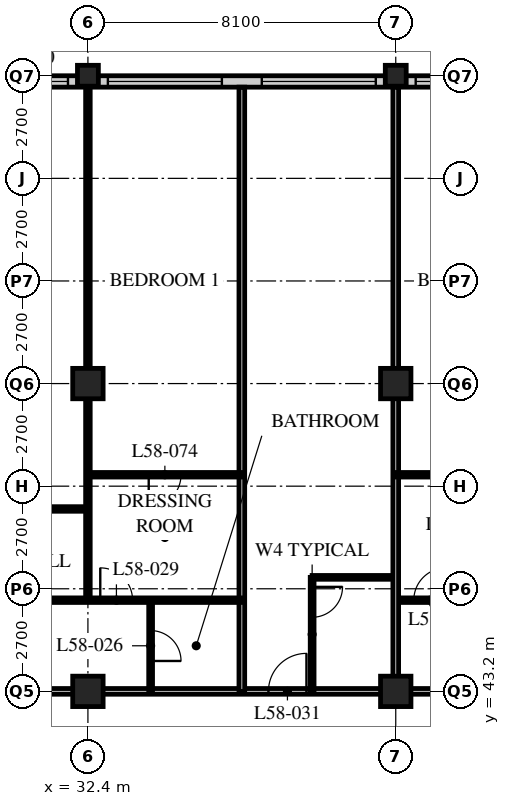
"""IFC4 building model, lengths in metres.
Left out: names, types, materials, properties, quantities, classifications, styles, units other than length and angle.
Written with IfcOpenShell. Run it as: python <this file> out.ifc"""

import sys

from ifc_helpers import new_model, si_unit, direction, frame, frame_2d, origin, origin_2d, place, context, subcontext, project, spatial, rectangle, hollow_rectangle, extrude, element, fill, save


model = new_model("IFC4")
c1 = context("Model", 3, precision=1e-05, world=origin(), true_north=direction((0.0, 1.0)))
c2 = subcontext(c1, "Body", "Model", "MODEL_VIEW")
j1 = project(units=[si_unit("LENGTHUNIT", "METRE"), si_unit("PLANEANGLEUNIT", "RADIAN")], contexts=[c1])
p1 = place(None, origin())
s1 = spatial("IfcSite", under=j1, at=p1, CompositionType="ELEMENT")
p2 = place(p1, origin())
s2 = spatial("IfcBuilding", under=s1, at=p2, CompositionType="ELEMENT")
p3 = place(p2, frame((0.0, 0.0, 224.4)))
s3 = spatial("IfcBuildingStorey", under=s2, at=p3, CompositionType="ELEMENT", Elevation=224.4)
for number, where, z_axis, x_axis in (
    (1, (32.4, 43.2, 0.0), (0.0, 0.0, 1.0), (1.0, 0.0, 0.0)),
    (2, (32.4, 51.3, 0.0), (0.0, 0.0, 1.0), (1.0, 0.0, 0.0)),
):
    element("IfcColumn", number, at=place(p3, frame(where, z_axis=z_axis, x_axis=x_axis)), inside=s3, PredefinedType="COLUMN", context=c2, shape_type="SweptSolid", body=[
        extrude(hollow_rectangle(XDim=0.8, YDim=0.8, WallThickness=0.08, at=origin_2d()), origin(), (0.0, 0.0, 1.0), 3.6),
    ])
p4 = place(p3, frame((32.4, 59.4, 0.0), z_axis=(0.0, 0.0, 1.0), x_axis=(1.0, 0.0, 0.0)))
e3 = element("IfcColumn", 3, at=p4, inside=s3, PredefinedType="COLUMN", context=c2, shape_type="SweptSolid", body=[
    extrude(hollow_rectangle(XDim=0.55, YDim=0.55, WallThickness=0.045, at=origin_2d()), origin(), (0.0, 0.0, 1.0), 3.6),
])
for number, where, z_axis, x_axis in (
    (4, (40.5, 43.2, 0.0), (0.0, 0.0, 1.0), (1.0, 0.0, 0.0)),
    (5, (40.5, 51.3, 0.0), (0.0, 0.0, 1.0), (1.0, 0.0, 0.0)),
):
    element("IfcColumn", number, at=place(p3, frame(where, z_axis=z_axis, x_axis=x_axis)), inside=s3, PredefinedType="COLUMN", context=c2, shape_type="SweptSolid", body=[
        extrude(hollow_rectangle(XDim=0.8, YDim=0.8, WallThickness=0.08, at=origin_2d()), origin(), (0.0, 0.0, 1.0), 3.6),
    ])
p5 = place(p3, frame((40.5, 59.4, 0.0), z_axis=(0.0, 0.0, 1.0), x_axis=(1.0, 0.0, 0.0)))
e6 = element("IfcColumn", 6, at=p5, inside=s3, PredefinedType="COLUMN", context=c2, shape_type="SweptSolid", body=[
    extrude(hollow_rectangle(XDim=0.55, YDim=0.55, WallThickness=0.045, at=origin_2d()), origin(), (0.0, 0.0, 1.0), 3.6),
])
p6 = place(p3, frame((48.3, 59.25, 0.0), z_axis=(0.0, 0.0, 1.0), x_axis=(-1.0, 0.0, 0.0)))
e7 = element("IfcWall", 7, at=p6, inside=s3, PredefinedType="SOLIDWALL", context=c2, shape_type="SweptSolid", body=[
    extrude(rectangle(XDim=40.2, YDim=0.3, at=frame_2d((20.1, 0.0))), origin(), (0.0, 0.0, 1.0), 3.39),
])
p7 = place(p6, frame((0.225, 0.0, 0.6)))
e8 = element("IfcOpeningElement", 8, at=p7, cuts=e7, PredefinedType="OPENING", context=c2, shape_type="SweptSolid", body=[
    extrude(rectangle(XDim=3.0, YDim=2.0, at=frame_2d((1.5, 1.0))), frame((0.0, 0.16, 0.0), z_axis=(0.0, -1.0, 0.0), x_axis=(1.0, 0.0, 0.0)), (0.0, 0.0, 1.0), 0.32),
])
p8 = place(p6, frame((4.275, 0.0, 0.6)))
e9 = element("IfcOpeningElement", 9, at=p8, cuts=e7, PredefinedType="OPENING", context=c2, shape_type="SweptSolid", body=[
    extrude(rectangle(XDim=3.0, YDim=2.0, at=frame_2d((1.5, 1.0))), frame((0.0, 0.16, 0.0), z_axis=(0.0, -1.0, 0.0), x_axis=(1.0, 0.0, 0.0)), (0.0, 0.0, 1.0), 0.32),
])
p9 = place(p6, frame((8.325, 0.0, 0.6)))
e10 = element("IfcOpeningElement", 10, at=p9, cuts=e7, PredefinedType="OPENING", context=c2, shape_type="SweptSolid", body=[
    extrude(rectangle(XDim=3.0, YDim=2.0, at=frame_2d((1.5, 1.0))), frame((0.0, 0.16, 0.0), z_axis=(0.0, -1.0, 0.0), x_axis=(1.0, 0.0, 0.0)), (0.0, 0.0, 1.0), 0.32),
])
p10 = place(p6, frame((12.375, 0.0, 0.6)))
e11 = element("IfcOpeningElement", 11, at=p10, cuts=e7, PredefinedType="OPENING", context=c2, shape_type="SweptSolid", body=[
    extrude(rectangle(XDim=3.0, YDim=2.0, at=frame_2d((1.5, 1.0))), frame((0.0, 0.16, 0.0), z_axis=(0.0, -1.0, 0.0), x_axis=(1.0, 0.0, 0.0)), (0.0, 0.0, 1.0), 0.32),
])
p11 = place(p6, frame((16.425, 0.0, 0.6)))
e12 = element("IfcOpeningElement", 12, at=p11, cuts=e7, PredefinedType="OPENING", context=c2, shape_type="SweptSolid", body=[
    extrude(rectangle(XDim=3.0, YDim=2.0, at=frame_2d((1.5, 1.0))), frame((0.0, 0.16, 0.0), z_axis=(0.0, -1.0, 0.0), x_axis=(1.0, 0.0, 0.0)), (0.0, 0.0, 1.0), 0.32),
])
p12 = place(p6, frame((20.475, 0.0, 0.6)))
e13 = element("IfcOpeningElement", 13, at=p12, cuts=e7, PredefinedType="OPENING", context=c2, shape_type="SweptSolid", body=[
    extrude(rectangle(XDim=3.0, YDim=2.0, at=frame_2d((1.5, 1.0))), frame((0.0, 0.16, 0.0), z_axis=(0.0, -1.0, 0.0), x_axis=(1.0, 0.0, 0.0)), (0.0, 0.0, 1.0), 0.32),
])
p13 = place(p6, frame((24.525, 0.0, 0.6)))
e14 = element("IfcOpeningElement", 14, at=p13, cuts=e7, PredefinedType="OPENING", context=c2, shape_type="SweptSolid", body=[
    extrude(rectangle(XDim=3.0, YDim=2.0, at=frame_2d((1.5, 1.0))), frame((0.0, 0.16, 0.0), z_axis=(0.0, -1.0, 0.0), x_axis=(1.0, 0.0, 0.0)), (0.0, 0.0, 1.0), 0.32),
])
p14 = place(p6, frame((28.575, 0.0, 0.6)))
e15 = element("IfcOpeningElement", 15, at=p14, cuts=e7, PredefinedType="OPENING", context=c2, shape_type="SweptSolid", body=[
    extrude(rectangle(XDim=3.0, YDim=2.0, at=frame_2d((1.5, 1.0))), frame((0.0, 0.16, 0.0), z_axis=(0.0, -1.0, 0.0), x_axis=(1.0, 0.0, 0.0)), (0.0, 0.0, 1.0), 0.32),
])
p15 = place(p6, frame((32.625, 0.0, 0.6)))
e16 = element("IfcOpeningElement", 16, at=p15, cuts=e7, PredefinedType="OPENING", context=c2, shape_type="SweptSolid", body=[
    extrude(rectangle(XDim=3.0, YDim=2.0, at=frame_2d((1.5, 1.0))), frame((0.0, 0.16, 0.0), z_axis=(0.0, -1.0, 0.0), x_axis=(1.0, 0.0, 0.0)), (0.0, 0.0, 1.0), 0.32),
])
p16 = place(p6, frame((36.675, 0.0, 0.6)))
e17 = element("IfcOpeningElement", 17, at=p16, cuts=e7, PredefinedType="OPENING", context=c2, shape_type="SweptSolid", body=[
    extrude(rectangle(XDim=3.0, YDim=2.0, at=frame_2d((1.5, 1.0))), frame((0.0, 0.16, 0.0), z_axis=(0.0, -1.0, 0.0), x_axis=(1.0, 0.0, 0.0)), (0.0, 0.0, 1.0), 0.32),
])
p17 = place(p3, frame((8.1, 43.2, 0.0), z_axis=(0.0, 0.0, 1.0), x_axis=(1.0, 0.0, 0.0)))
e18 = element("IfcWall", 18, at=p17, inside=s3, PredefinedType="PARTITIONING", context=c2, shape_type="SweptSolid", body=[
    extrude(rectangle(XDim=36.45, YDim=0.15, at=frame_2d((18.225, 0.0))), origin(), (0.0, 0.0, 1.0), 2.628),
])
p18 = place(p17, frame((4.45, 0.0, 0.0)))
e19 = element("IfcOpeningElement", 19, at=p18, cuts=e18, PredefinedType="OPENING", context=c2, shape_type="SweptSolid", body=[
    extrude(rectangle(XDim=1.0, YDim=2.1, at=frame_2d((0.5, 1.05))), frame((0.0, 0.085, 0.0), z_axis=(0.0, -1.0, 0.0), x_axis=(1.0, 0.0, 0.0)), (0.0, 0.0, 1.0), 0.17),
])
p19 = place(p17, frame((17.1, 0.0, 0.0)))
e20 = element("IfcOpeningElement", 20, at=p19, cuts=e18, PredefinedType="OPENING", context=c2, shape_type="SweptSolid", body=[
    extrude(rectangle(XDim=1.0, YDim=2.1, at=frame_2d((0.5, 1.05))), frame((0.0, 0.085, 0.0), z_axis=(0.0, -1.0, 0.0), x_axis=(1.0, 0.0, 0.0)), (0.0, 0.0, 1.0), 0.17),
])
p20 = place(p17, frame((29.05, 0.0, 0.0)))
e21 = element("IfcOpeningElement", 21, at=p20, cuts=e18, PredefinedType="OPENING", context=c2, shape_type="SweptSolid", body=[
    extrude(rectangle(XDim=1.0, YDim=2.1, at=frame_2d((0.5, 1.05))), frame((0.0, 0.085, 0.0), z_axis=(0.0, -1.0, 0.0), x_axis=(1.0, 0.0, 0.0)), (0.0, 0.0, 1.0), 0.17),
])
p21 = place(p17, frame((33.925, 0.0, 0.0)))
e22 = element("IfcOpeningElement", 22, at=p21, cuts=e18, PredefinedType="OPENING", context=c2, shape_type="SweptSolid", body=[
    extrude(rectangle(XDim=1.0, YDim=2.1, at=frame_2d((0.5, 1.05))), frame((0.0, 0.085, 0.0), z_axis=(0.0, -1.0, 0.0), x_axis=(1.0, 0.0, 0.0)), (0.0, 0.0, 1.0), 0.17),
])
p22 = place(p17, frame((1.525, 0.0, 0.0)))
e23 = element("IfcOpeningElement", 23, at=p22, cuts=e18, PredefinedType="OPENING", context=c2, shape_type="SweptSolid", body=[
    extrude(rectangle(XDim=1.0, YDim=2.1, at=frame_2d((0.5, 1.05))), frame((0.0, 0.085, 0.0), z_axis=(0.0, -1.0, 0.0), x_axis=(1.0, 0.0, 0.0)), (0.0, 0.0, 1.0), 0.17),
])
p23 = place(p3, frame((34.05, 43.2, 0.0), z_axis=(0.0, 0.0, 1.0), x_axis=(0.0, 1.0, 0.0)))
e24 = element("IfcWall", 24, at=p23, inside=s3, PredefinedType="PARTITIONING", context=c2, shape_type="SweptSolid", body=[
    extrude(rectangle(XDim=2.4, YDim=0.1, at=frame_2d((1.2, 0.0))), origin(), (0.0, 0.0, 1.0), 3.39),
])
p24 = place(p23, frame((0.8, 0.0, 0.0)))
e25 = element("IfcOpeningElement", 25, at=p24, cuts=e24, PredefinedType="OPENING", context=c2, shape_type="SweptSolid", body=[
    extrude(rectangle(XDim=0.8, YDim=2.1, at=frame_2d((0.4, 1.05))), frame((0.0, 0.06, 0.0), z_axis=(0.0, -1.0, 0.0), x_axis=(1.0, 0.0, 0.0)), (0.0, 0.0, 1.0), 0.12),
])
p25 = place(p3, frame((32.4, 45.6, 0.0), z_axis=(0.0, 0.0, 1.0), x_axis=(0.0, 1.0, 0.0)))
e26 = element("IfcWall", 26, at=p25, inside=s3, PredefinedType="PARTITIONING", context=c2, shape_type="SweptSolid", body=[
    extrude(rectangle(XDim=13.5, YDim=0.12, at=frame_2d((6.75, 0.0))), origin(), (0.0, 0.0, 1.0), 2.628),
])
p26 = place(p3, frame((36.45, 43.2, 0.0), z_axis=(0.0, 0.0, 1.0), x_axis=(0.0, 1.0, 0.0)))
e27 = element("IfcWall", 27, at=p26, inside=s3, PredefinedType="PARTITIONING", context=c2, shape_type="SweptSolid", body=[
    extrude(rectangle(XDim=15.9, YDim=0.15, at=frame_2d((7.95, 0.0))), origin(), (0.0, 0.0, 1.0), 3.39),
])
p27 = place(p3, frame((38.3, 46.2, 0.0), z_axis=(0.0, 0.0, 1.0), x_axis=(1.0, 0.0, 0.0)))
e28 = element("IfcWall", 28, at=p27, inside=s3, PredefinedType="PARTITIONING", context=c2, shape_type="SweptSolid", body=[
    extrude(rectangle(XDim=2.2, YDim=0.1, at=frame_2d((1.1, 0.0))), origin(), (0.0, 0.0, 1.0), 3.39),
])
p28 = place(p3, frame((38.3, 43.2, 0.0), z_axis=(0.0, 0.0, 1.0), x_axis=(0.0, 1.0, 0.0)))
e29 = element("IfcWall", 29, at=p28, inside=s3, PredefinedType="PARTITIONING", context=c2, shape_type="SweptSolid", body=[
    extrude(rectangle(XDim=3.0, YDim=0.1, at=frame_2d((1.5, 0.0))), origin(), (0.0, 0.0, 1.0), 3.39),
])
p29 = place(p28, frame((1.95, 0.0, 0.0)))
e30 = element("IfcOpeningElement", 30, at=p29, cuts=e29, PredefinedType="OPENING", context=c2, shape_type="SweptSolid", body=[
    extrude(rectangle(XDim=0.8, YDim=2.1, at=frame_2d((0.4, 1.05))), frame((0.0, 0.06, 0.0), z_axis=(0.0, -1.0, 0.0), x_axis=(1.0, 0.0, 0.0)), (0.0, 0.0, 1.0), 0.12),
])
p30 = place(p3, frame((40.5, 45.6, 0.0), z_axis=(0.0, 0.0, 1.0), x_axis=(1.0, 0.0, 0.0)))
e31 = element("IfcWall", 31, at=p30, inside=s3, PredefinedType="PARTITIONING", context=c2, shape_type="SweptSolid", body=[
    extrude(rectangle(XDim=8.05, YDim=0.12, at=frame_2d((4.025, 0.0))), origin(), (0.0, 0.0, 1.0), 3.39),
])
p31 = place(p30, frame((0.475, 0.0, 0.0)))
e32 = element("IfcOpeningElement", 32, at=p31, cuts=e31, PredefinedType="OPENING", context=c2, shape_type="SweptSolid", body=[
    extrude(rectangle(XDim=0.85, YDim=2.1, at=frame_2d((0.425, 1.05))), frame((0.0, 0.07, 0.0), z_axis=(0.0, -1.0, 0.0), x_axis=(1.0, 0.0, 0.0)), (0.0, 0.0, 1.0), 0.14),
])
p32 = place(p30, frame((4.325, 0.0, 0.0)))
e33 = element("IfcOpeningElement", 33, at=p32, cuts=e31, PredefinedType="OPENING", context=c2, shape_type="SweptSolid", body=[
    extrude(rectangle(XDim=0.85, YDim=2.1, at=frame_2d((0.425, 1.05))), frame((0.0, 0.07, 0.0), z_axis=(0.0, -1.0, 0.0), x_axis=(1.0, 0.0, 0.0)), (0.0, 0.0, 1.0), 0.14),
])
p33 = place(p3, frame((40.5, 43.2, 0.0), z_axis=(0.0, 0.0, 1.0), x_axis=(0.0, 1.0, 0.0)))
e34 = element("IfcWall", 34, at=p33, inside=s3, PredefinedType="PARTITIONING", context=c2, shape_type="SweptSolid", body=[
    extrude(rectangle(XDim=15.9, YDim=0.15, at=frame_2d((7.95, 0.0))), origin(), (0.0, 0.0, 1.0), 2.628),
])
p34 = place(p3, frame((4.1, 45.6, 0.0), z_axis=(0.0, 0.0, 1.0), x_axis=(1.0, 0.0, 0.0)))
e35 = element("IfcWall", 35, at=p34, inside=s3, PredefinedType="PARTITIONING", context=c2, shape_type="SweptSolid", body=[
    extrude(rectangle(XDim=32.35, YDim=0.12, at=frame_2d((16.175, 0.0))), origin(), (0.0, 0.0, 1.0), 3.39),
])
p35 = place(p34, frame((9.025, 0.0, 0.0)))
e36 = element("IfcOpeningElement", 36, at=p35, cuts=e35, PredefinedType="OPENING", context=c2, shape_type="SweptSolid", body=[
    extrude(rectangle(XDim=0.85, YDim=2.1, at=frame_2d((0.425, 1.05))), frame((0.0, 0.07, 0.0), z_axis=(0.0, -1.0, 0.0), x_axis=(1.0, 0.0, 0.0)), (0.0, 0.0, 1.0), 0.14),
])
p36 = place(p34, frame((16.475, 0.0, 0.0)))
e37 = element("IfcOpeningElement", 37, at=p36, cuts=e35, PredefinedType="OPENING", context=c2, shape_type="SweptSolid", body=[
    extrude(rectangle(XDim=0.85, YDim=2.1, at=frame_2d((0.425, 1.05))), frame((0.0, 0.07, 0.0), z_axis=(0.0, -1.0, 0.0), x_axis=(1.0, 0.0, 0.0)), (0.0, 0.0, 1.0), 0.14),
])
p37 = place(p34, frame((21.175, 0.0, 0.0)))
e38 = element("IfcOpeningElement", 38, at=p37, cuts=e35, PredefinedType="OPENING", context=c2, shape_type="SweptSolid", body=[
    extrude(rectangle(XDim=0.85, YDim=2.1, at=frame_2d((0.425, 1.05))), frame((0.0, 0.07, 0.0), z_axis=(0.0, -1.0, 0.0), x_axis=(1.0, 0.0, 0.0)), (0.0, 0.0, 1.0), 0.14),
])
p38 = place(p34, frame((28.625, 0.0, 0.0)))
e39 = element("IfcOpeningElement", 39, at=p38, cuts=e35, PredefinedType="OPENING", context=c2, shape_type="SweptSolid", body=[
    extrude(rectangle(XDim=0.85, YDim=2.1, at=frame_2d((0.425, 1.05))), frame((0.0, 0.07, 0.0), z_axis=(0.0, -1.0, 0.0), x_axis=(1.0, 0.0, 0.0)), (0.0, 0.0, 1.0), 0.14),
])
p39 = place(p34, frame((6.725, 0.0, 0.0)))
e40 = element("IfcOpeningElement", 40, at=p39, cuts=e35, PredefinedType="OPENING", context=c2, shape_type="SweptSolid", body=[
    extrude(rectangle(XDim=0.85, YDim=2.1, at=frame_2d((0.425, 1.05))), frame((0.0, 0.07, 0.0), z_axis=(0.0, -1.0, 0.0), x_axis=(1.0, 0.0, 0.0)), (0.0, 0.0, 1.0), 0.14),
])
p40 = place(p34, frame((2.875, 0.0, 0.0)))
e41 = element("IfcOpeningElement", 41, at=p40, cuts=e35, PredefinedType="OPENING", context=c2, shape_type="SweptSolid", body=[
    extrude(rectangle(XDim=0.85, YDim=2.1, at=frame_2d((0.425, 1.05))), frame((0.0, 0.07, 0.0), z_axis=(0.0, -1.0, 0.0), x_axis=(1.0, 0.0, 0.0)), (0.0, 0.0, 1.0), 0.14),
])
p41 = place(p3, frame((24.3, 48.0, 0.0), z_axis=(0.0, 0.0, 1.0), x_axis=(1.0, 0.0, 0.0)))
e42 = element("IfcWall", 42, at=p41, inside=s3, PredefinedType="PARTITIONING", context=c2, shape_type="SweptSolid", body=[
    extrude(rectangle(XDim=8.1, YDim=0.12, at=frame_2d((4.05, 0.0))), origin(), (0.0, 0.0, 1.0), 3.39),
])
p42 = place(p41, frame((3.625, 0.0, 0.0)))
e43 = element("IfcOpeningElement", 43, at=p42, cuts=e42, PredefinedType="OPENING", context=c2, shape_type="SweptSolid", body=[
    extrude(rectangle(XDim=0.85, YDim=2.1, at=frame_2d((0.425, 1.05))), frame((0.0, 0.07, 0.0), z_axis=(0.0, -1.0, 0.0), x_axis=(1.0, 0.0, 0.0)), (0.0, 0.0, 1.0), 0.14),
])
p43 = place(p3, frame((32.4, 48.9, 0.0), z_axis=(0.0, 0.0, 1.0), x_axis=(1.0, 0.0, 0.0)))
e44 = element("IfcWall", 44, at=p43, inside=s3, PredefinedType="PARTITIONING", context=c2, shape_type="SweptSolid", body=[
    extrude(rectangle(XDim=4.05, YDim=0.12, at=frame_2d((2.025, 0.0))), origin(), (0.0, 0.0, 1.0), 3.39),
])
p44 = place(p43, frame((1.6, 0.0, 0.0)))
e45 = element("IfcOpeningElement", 45, at=p44, cuts=e44, PredefinedType="OPENING", context=c2, shape_type="SweptSolid", body=[
    extrude(rectangle(XDim=0.85, YDim=2.1, at=frame_2d((0.425, 1.05))), frame((0.0, 0.07, 0.0), z_axis=(0.0, -1.0, 0.0), x_axis=(1.0, 0.0, 0.0)), (0.0, 0.0, 1.0), 0.14),
])
p45 = place(p3, frame((40.5, 48.9, 0.0), z_axis=(0.0, 0.0, 1.0), x_axis=(1.0, 0.0, 0.0)))
e46 = element("IfcWall", 46, at=p45, inside=s3, PredefinedType="PARTITIONING", context=c2, shape_type="SweptSolid", body=[
    extrude(rectangle(XDim=4.05, YDim=0.12, at=frame_2d((2.025, 0.0))), origin(), (0.0, 0.0, 1.0), 3.39),
])
p46 = place(p45, frame((1.6, 0.0, 0.0)))
e47 = element("IfcOpeningElement", 47, at=p46, cuts=e46, PredefinedType="OPENING", context=c2, shape_type="SweptSolid", body=[
    extrude(rectangle(XDim=0.85, YDim=2.1, at=frame_2d((0.425, 1.05))), frame((0.0, 0.07, 0.0), z_axis=(0.0, -1.0, 0.0), x_axis=(1.0, 0.0, 0.0)), (0.0, 0.0, 1.0), 0.14),
])
p47 = place(p8, origin())
e48 = element("IfcWindow", 48, at=p47, inside=s3, PartitioningType="SINGLE_PANEL", PredefinedType="WINDOW", context=c2, shape_type="SweptSolid", body=[
    extrude(rectangle(XDim=3.0, YDim=2.0, at=frame_2d((1.5, 1.0))), frame((0.0, 0.03, 0.0), z_axis=(0.0, -1.0, 0.0), x_axis=(1.0, 0.0, 0.0)), (0.0, 0.0, 1.0), 0.06),
])
fill(e9, e48)
p48 = place(p9, origin())
e49 = element("IfcWindow", 49, at=p48, inside=s3, PartitioningType="SINGLE_PANEL", PredefinedType="WINDOW", context=c2, shape_type="SweptSolid", body=[
    extrude(rectangle(XDim=3.0, YDim=2.0, at=frame_2d((1.5, 1.0))), frame((0.0, 0.03, 0.0), z_axis=(0.0, -1.0, 0.0), x_axis=(1.0, 0.0, 0.0)), (0.0, 0.0, 1.0), 0.06),
])
fill(e10, e49)
p49 = place(p10, origin())
e50 = element("IfcWindow", 50, at=p49, inside=s3, PartitioningType="SINGLE_PANEL", PredefinedType="WINDOW", context=c2, shape_type="SweptSolid", body=[
    extrude(rectangle(XDim=3.0, YDim=2.0, at=frame_2d((1.5, 1.0))), frame((0.0, 0.03, 0.0), z_axis=(0.0, -1.0, 0.0), x_axis=(1.0, 0.0, 0.0)), (0.0, 0.0, 1.0), 0.06),
])
fill(e11, e50)
p50 = place(p11, origin())
e51 = element("IfcWindow", 51, at=p50, inside=s3, PartitioningType="SINGLE_PANEL", PredefinedType="WINDOW", context=c2, shape_type="SweptSolid", body=[
    extrude(rectangle(XDim=3.0, YDim=2.0, at=frame_2d((1.5, 1.0))), frame((0.0, 0.03, 0.0), z_axis=(0.0, -1.0, 0.0), x_axis=(1.0, 0.0, 0.0)), (0.0, 0.0, 1.0), 0.06),
])
fill(e12, e51)
p51 = place(p24, origin())
e52 = element("IfcDoor", 52, at=p51, inside=s3, OperationType="SINGLE_SWING_RIGHT", PredefinedType="DOOR", context=c2, shape_type="SweptSolid", body=[
    extrude(rectangle(XDim=0.8, YDim=2.1, at=frame_2d((0.4, 1.05))), frame((0.0, 0.025, 0.0), z_axis=(0.0, -1.0, 0.0), x_axis=(1.0, 0.0, 0.0)), (0.0, 0.0, 1.0), 0.05),
])
fill(e25, e52)
p52 = place(p38, origin())
e53 = element("IfcDoor", 53, at=p52, inside=s3, OperationType="SINGLE_SWING_LEFT", PredefinedType="DOOR", context=c2, shape_type="SweptSolid", body=[
    extrude(rectangle(XDim=0.85, YDim=2.1, at=frame_2d((0.425, 1.05))), frame((0.0, 0.025, 0.0), z_axis=(0.0, -1.0, 0.0), x_axis=(1.0, 0.0, 0.0)), (0.0, 0.0, 1.0), 0.05),
])
fill(e39, e53)
p53 = place(p29, origin())
e54 = element("IfcDoor", 54, at=p53, inside=s3, OperationType="SINGLE_SWING_LEFT", PredefinedType="DOOR", context=c2, shape_type="SweptSolid", body=[
    extrude(rectangle(XDim=0.8, YDim=2.1, at=frame_2d((0.4, 1.05))), frame((0.0, 0.025, 0.0), z_axis=(0.0, -1.0, 0.0), x_axis=(1.0, 0.0, 0.0)), (0.0, 0.0, 1.0), 0.05),
])
fill(e30, e54)
p54 = place(p20, origin())
e55 = element("IfcDoor", 55, at=p54, inside=s3, OperationType="SINGLE_SWING_RIGHT", PredefinedType="DOOR", context=c2, shape_type="SweptSolid", body=[
    extrude(rectangle(XDim=1.0, YDim=2.1, at=frame_2d((0.5, 1.05))), frame((0.0, 0.025, 0.0), z_axis=(0.0, -1.0, 0.0), x_axis=(1.0, 0.0, 0.0)), (0.0, 0.0, 1.0), 0.05),
])
fill(e21, e55)
p55 = place(p31, origin())
e56 = element("IfcDoor", 56, at=p55, inside=s3, OperationType="SINGLE_SWING_RIGHT", PredefinedType="DOOR", context=c2, shape_type="SweptSolid", body=[
    extrude(rectangle(XDim=0.85, YDim=2.1, at=frame_2d((0.425, 1.05))), frame((0.0, 0.025, 0.0), z_axis=(0.0, -1.0, 0.0), x_axis=(1.0, 0.0, 0.0)), (0.0, 0.0, 1.0), 0.05),
])
fill(e32, e56)
p56 = place(p44, origin())
e57 = element("IfcDoor", 57, at=p56, inside=s3, OperationType="SINGLE_SWING_RIGHT", PredefinedType="DOOR", context=c2, shape_type="SweptSolid", body=[
    extrude(rectangle(XDim=0.85, YDim=2.1, at=frame_2d((0.425, 1.05))), frame((0.0, 0.025, 0.0), z_axis=(0.0, -1.0, 0.0), x_axis=(1.0, 0.0, 0.0)), (0.0, 0.0, 1.0), 0.05),
])
fill(e45, e57)
save(model, sys.argv[1])
